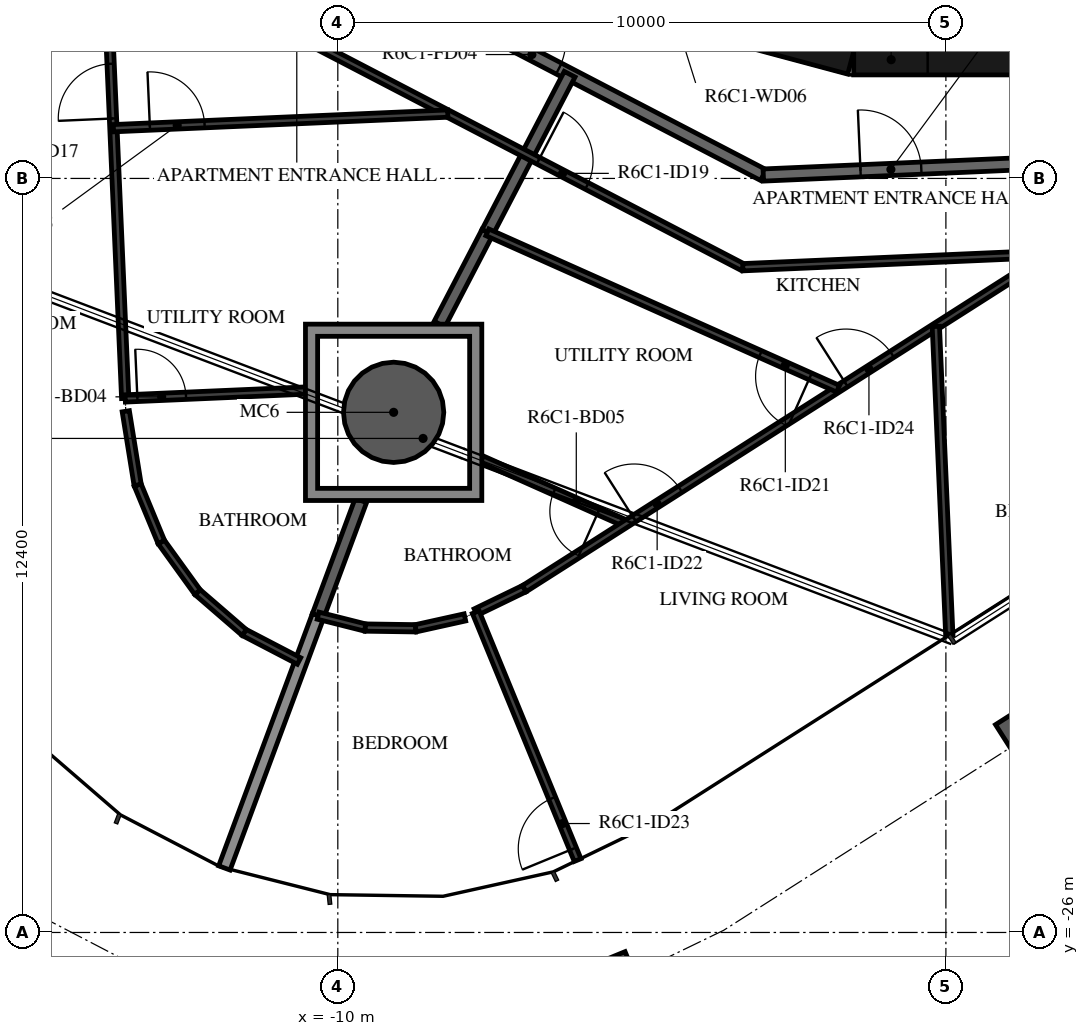
"""IFC4 building model, lengths in metres.
Left out: names, types, materials, properties, quantities, classifications, styles, units other than length and angle.
Written with IfcOpenShell. Run it as: python <this file> out.ifc"""

import sys

from ifc_helpers import new_model, si_unit, direction, frame, frame_2d, origin, origin_2d, place, context, subcontext, project, spatial, polyline, rectangle, hollow_circle, i_section, outline, extrude, element, fill, save


model = new_model("IFC4")
c1 = context("Model", 3, precision=1e-05, world=origin(), true_north=direction((0.0, 1.0)))
c2 = subcontext(c1, "Body", "Model", "MODEL_VIEW")
j1 = project(units=[si_unit("LENGTHUNIT", "METRE"), si_unit("PLANEANGLEUNIT", "RADIAN")], contexts=[c1])
p1 = place(None, origin())
s1 = spatial("IfcSite", under=j1, at=p1, CompositionType="ELEMENT")
p2 = place(p1, origin())
s2 = spatial("IfcBuilding", under=s1, at=p2, CompositionType="ELEMENT")
p3 = place(p2, frame((0.0, 0.0, 251.2)))
s3 = spatial("IfcBuildingStorey", under=s2, at=p3, CompositionType="ELEMENT", Elevation=251.2)
p4 = place(p3, frame((-9.082, -17.446, -0.38), z_axis=(0.0, 0.0, 1.0), x_axis=(1.0, 0.0, 0.0)))
e1 = element("IfcColumn", 1, at=p4, inside=s3, PredefinedType="COLUMN", context=c2, shape_type="SweptSolid", body=[
    extrude(hollow_circle(Radius=0.825, WallThickness=0.04, at=origin_2d()), origin(), (0.0, 0.0, 1.0), 3.5),
])
for number, where, z_axis, x_axis in (
    (2, (-5.243, -26.789, -0.38), (0.0, 0.0, 1.0), (-0.925, -0.38, 0.0)),
    (3, (1.185, -22.881, -0.38), (0.0, 0.0, 1.0), (-0.843, -0.537, 0.0)),
):
    element("IfcColumn", number, at=place(p3, frame(where, z_axis=z_axis, x_axis=x_axis)), inside=s3, PredefinedType="COLUMN", context=c2, shape_type="SweptSolid", body=[
        extrude(i_section(OverallWidth=0.3, OverallDepth=0.9, WebThickness=0.019, FlangeThickness=0.035, FilletRadius=0.03, at=origin_2d()), origin(), (0.0, 0.0, 1.0), 3.5),
    ])
p5 = place(p3, frame((-4.479, -10.858, 0.0), z_axis=(0.0, 0.0, 1.0), x_axis=(0.965948410781, -0.258734743916, 0.0)))
e4 = element("IfcWall", 4, at=p5, inside=s3, PredefinedType="SHEAR", context=c2, shape_type="SweptSolid", body=[
    extrude(rectangle(XDim=3.033, YDim=0.5, at=frame_2d((1.516, 0.0))), origin(), (0.0, 0.0, 1.0), 3.12),
])
p6 = place(p3, frame((-1.516, -11.647, 0.0), z_axis=(0.0, 0.0, 1.0), x_axis=(1.0, 0.0, 0.0)))
e5 = element("IfcWall", 5, at=p6, inside=s3, PredefinedType="SHEAR", context=c2, shape_type="SweptSolid", body=[
    extrude(rectangle(XDim=3.033, YDim=0.5, at=frame_2d((1.516, 0.0))), origin(), (0.0, 0.0, 1.0), 3.12),
])
p7 = place(p6, frame((0.016, 0.0, 0.0)))
e6 = element("IfcOpeningElement", 6, at=p7, cuts=e5, PredefinedType="OPENING", context=c2, shape_type="SweptSolid", body=[
    extrude(rectangle(XDim=1.2, YDim=2.1, at=frame_2d((0.6, 1.05))), frame((0.0, 0.26, 0.0), z_axis=(0.0, -1.0, 0.0), x_axis=(1.0, 0.0, 0.0)), (0.0, 0.0, 1.0), 0.52),
])
p8 = place(p3, frame((-9.372, -10.228, 0.0), z_axis=(0.0, 0.0, 1.0), x_axis=(0.887005184532, -0.461759464021, 0.0)))
e7 = element("IfcWall", 7, at=p8, inside=s3, PredefinedType="STANDARD", context=c2, shape_type="SweptSolid", body=[
    extrude(rectangle(XDim=7.181, YDim=0.2, at=frame_2d((3.591, 0.0))), origin(), (0.0, 0.0, 1.0), 3.12),
])
p9 = place(p8, frame((2.391, 0.0, 0.0)))
e8 = element("IfcOpeningElement", 8, at=p9, cuts=e7, PredefinedType="OPENING", context=c2, shape_type="SweptSolid", body=[
    extrude(rectangle(XDim=1.0, YDim=2.1, at=frame_2d((0.5, 1.05))), frame((0.0, 0.11, 0.0), z_axis=(0.0, -1.0, 0.0), x_axis=(1.0, 0.0, 0.0)), (0.0, 0.0, 1.0), 0.22),
])
p10 = place(p3, frame((-3.003, -13.544, 0.0), z_axis=(0.0, 0.0, 1.0), x_axis=(0.999048221872, 0.043619380718, 0.0)))
e9 = element("IfcWall", 9, at=p10, inside=s3, PredefinedType="STANDARD", context=c2, shape_type="SweptSolid", body=[
    extrude(rectangle(XDim=6.979, YDim=0.2, at=frame_2d((3.49, 0.0))), origin(), (0.0, 0.0, 1.0), 3.12),
])
p11 = place(p10, frame((1.6, 0.0, 0.0)))
e10 = element("IfcOpeningElement", 10, at=p11, cuts=e9, PredefinedType="OPENING", context=c2, shape_type="SweptSolid", body=[
    extrude(rectangle(XDim=1.0, YDim=2.1, at=frame_2d((0.5, 1.05))), frame((0.0, 0.11, 0.0), z_axis=(0.0, -1.0, 0.0), x_axis=(1.0, 0.0, 0.0)), (0.0, 0.0, 1.0), 0.22),
])
p12 = place(p3, frame((-7.541, -14.486, 0.0), z_axis=(0.0, 0.0, 1.0), x_axis=(0.461746051786, 0.88701216658, 0.0)))
e11 = element("IfcWall", 11, at=p12, inside=s3, PredefinedType="STANDARD", context=c2, shape_type="SweptSolid", body=[
    extrude(rectangle(XDim=2.931, YDim=0.2, at=frame_2d((1.466, 0.0))), origin(), (0.0, 0.0, 1.0), 3.12),
])
p13 = place(p3, frame((-11.865, -24.939, 0.0), z_axis=(0.0, 0.0, 1.0), x_axis=(0.348214227297, 0.937414983829, 0.0)))
e12 = element("IfcWall", 12, at=p13, inside=s3, PredefinedType="STANDARD", context=c2, shape_type="SweptSolid", body=[
    extrude(rectangle(XDim=4.426, YDim=0.2, at=frame_2d((2.213, 0.0))), origin(), (0.0, 0.0, 1.0), 2.73),
])
p14 = place(p3, frame((-8.327, -15.996, 0.0), z_axis=(0.0, 0.0, 1.0), x_axis=(0.461722915657, 0.887024210017, 0.0)))
e13 = element("IfcWall", 13, at=p14, inside=s3, PredefinedType="STANDARD", context=c2, shape_type="SweptSolid", body=[
    extrude(rectangle(XDim=1.703, YDim=0.2, at=frame_2d((0.851, 0.0))), origin(), (0.0, 0.0, 1.0), 3.12),
])
p15 = place(p3, frame((-10.324, -20.79, 0.0), z_axis=(0.0, 0.0, 1.0), x_axis=(0.348313973933, 0.937377925686, 0.0)))
e14 = element("IfcWall", 14, at=p15, inside=s3, PredefinedType="STANDARD", context=c2, shape_type="SweptSolid", body=[
    extrude(rectangle(XDim=2.02, YDim=0.2, at=frame_2d((1.01, 0.0))), origin(), (0.0, 0.0, 1.0), 3.12),
])
p16 = place(p3, frame((-10.421, -11.373, 0.0), z_axis=(0.0, 0.0, 1.0), x_axis=(0.887012970857, -0.461744506769, 0.0)))
e15 = element("IfcWall", 15, at=p16, inside=s3, PredefinedType="PARTITIONING", context=c2, shape_type="SweptSolid", body=[
    extrude(rectangle(XDim=7.985, YDim=0.12, at=frame_2d((3.992, 0.0))), origin(), (0.0, 0.0, 1.0), 3.12),
])
p17 = place(p16, frame((4.192, 0.0, 0.0)))
e16 = element("IfcOpeningElement", 16, at=p17, cuts=e15, PredefinedType="OPENING", context=c2, shape_type="SweptSolid", body=[
    extrude(rectangle(XDim=0.9, YDim=2.1, at=frame_2d((0.45, 1.05))), frame((0.0, 0.07, 0.0), z_axis=(0.0, -1.0, 0.0), x_axis=(1.0, 0.0, 0.0)), (0.0, 0.0, 1.0), 0.14),
])
p18 = place(p3, frame((-13.496, -17.218, 0.0), z_axis=(0.0, 0.0, 1.0), x_axis=(-0.043640714674, 0.999047290183, 0.0)))
e17 = element("IfcWall", 17, at=p18, inside=s3, PredefinedType="PARTITIONING", context=c2, shape_type="SweptSolid", body=[
    extrude(rectangle(XDim=8.487, YDim=0.12, at=frame_2d((4.243, 0.0))), origin(), (0.0, 0.0, 1.0), 3.12),
])
p19 = place(p18, frame((4.608, 0.0, 0.0)))
e18 = element("IfcOpeningElement", 18, at=p19, cuts=e17, PredefinedType="OPENING", context=c2, shape_type="SweptSolid", body=[
    extrude(rectangle(XDim=0.9, YDim=2.1, at=frame_2d((0.45, 1.05))), frame((0.0, 0.07, 0.0), z_axis=(0.0, -1.0, 0.0), x_axis=(1.0, 0.0, 0.0)), (0.0, 0.0, 1.0), 0.14),
])
p20 = place(p3, frame((-17.215, -14.57, 0.0), z_axis=(0.0, 0.0, 1.0), x_axis=(0.520949659667, 0.853587401555, 0.0)))
e19 = element("IfcWall", 19, at=p20, inside=s3, PredefinedType="PARTITIONING", context=c2, shape_type="SweptSolid", body=[
    extrude(rectangle(XDim=6.455, YDim=0.12, at=frame_2d((3.228, 0.0))), origin(), (0.0, 0.0, 1.0), 3.12),
])
p21 = place(p20, frame((1.2, 0.0, 0.0)))
e20 = element("IfcOpeningElement", 20, at=p21, cuts=e19, PredefinedType="OPENING", context=c2, shape_type="SweptSolid", body=[
    extrude(rectangle(XDim=0.9, YDim=2.1, at=frame_2d((0.45, 1.05))), frame((0.0, 0.07, 0.0), z_axis=(0.0, -1.0, 0.0), x_axis=(1.0, 0.0, 0.0)), (0.0, 0.0, 1.0), 0.14),
])
p22 = place(p3, frame((-13.69, -12.774, 0.0), z_axis=(0.0, 0.0, 1.0), x_axis=(0.999048778431, 0.043606631553, 0.0)))
e21 = element("IfcWall", 21, at=p22, inside=s3, PredefinedType="PARTITIONING", context=c2, shape_type="SweptSolid", body=[
    extrude(rectangle(XDim=5.503, YDim=0.12, at=frame_2d((2.752, 0.0))), origin(), (0.0, 0.0, 1.0), 3.12),
])
p23 = place(p22, frame((0.6, 0.0, 0.0)))
e22 = element("IfcOpeningElement", 22, at=p23, cuts=e21, PredefinedType="OPENING", context=c2, shape_type="SweptSolid", body=[
    extrude(rectangle(XDim=0.9, YDim=2.1, at=frame_2d((0.45, 1.05))), frame((0.0, 0.07, 0.0), z_axis=(0.0, -1.0, 0.0), x_axis=(1.0, 0.0, 0.0)), (0.0, 0.0, 1.0), 0.14),
])
for number, where, z_axis, x_axis in (
    (23, (-10.638, -21.536, 0.0), (0.0, 0.0, 1.0), (-0.887, 0.462, 0.0)),
    (24, (-11.539, -21.067, 0.0), (0.0, 0.0, 1.0), (-0.757, 0.654, 0.0)),
    (25, (-12.308, -20.402, 0.0), (0.0, 0.0, 1.0), (-0.585, 0.811, 0.0)),
):
    element("IfcWall", number, at=place(p3, frame(where, z_axis=z_axis, x_axis=x_axis)), inside=s3, PredefinedType="PARTITIONING", context=c2, shape_type="SweptSolid", body=[
        extrude(rectangle(XDim=1.016, YDim=0.12, at=frame_2d((0.508, 0.0))), origin(), (0.0, 0.0, 1.0), 3.12),
    ])
p24 = place(p3, frame((-12.903, -19.579, 0.0), z_axis=(0.0, 0.0, 1.0), x_axis=(-0.382754975976, 0.923849894932, 0.0)))
e26 = element("IfcWall", 26, at=p24, inside=s3, PredefinedType="PARTITIONING", context=c2, shape_type="SweptSolid", body=[
    extrude(rectangle(XDim=1.016, YDim=0.12, at=frame_2d((0.508, 0.0))), origin(), (0.0, 0.0, 1.0), 3.12),
])
p25 = place(p3, frame((-13.292, -18.64, 0.0), z_axis=(0.0, 0.0, 1.0), x_axis=(-0.159363796836, 0.98721992497, 0.0)))
e27 = element("IfcWall", 27, at=p25, inside=s3, PredefinedType="PARTITIONING", context=c2, shape_type="SweptSolid", body=[
    extrude(rectangle(XDim=1.227, YDim=0.12, at=frame_2d((0.614, 0.0))), origin(), (0.0, 0.0, 1.0), 3.12),
])
p26 = place(p3, frame((-13.496, -17.218, 0.0), z_axis=(0.0, 0.0, 1.0), x_axis=(0.999044946677, 0.043694330507, 0.0)))
e28 = element("IfcWall", 28, at=p26, inside=s3, PredefinedType="PARTITIONING", context=c2, shape_type="SweptSolid", body=[
    extrude(rectangle(XDim=2.967, YDim=0.12, at=frame_2d((1.483, 0.0))), origin(), (0.0, 0.0, 1.0), 3.12),
])
p27 = place(p26, frame((0.2, 0.0, 0.0)))
e29 = element("IfcOpeningElement", 29, at=p27, cuts=e28, PredefinedType="OPENING", context=c2, shape_type="SweptSolid", body=[
    extrude(rectangle(XDim=0.8, YDim=2.1, at=frame_2d((0.4, 1.05))), frame((0.0, 0.07, 0.0), z_axis=(0.0, -1.0, 0.0), x_axis=(1.0, 0.0, 0.0)), (0.0, 0.0, 1.0), 0.14),
])
p28 = place(p3, frame((-3.339, -15.06, 0.0), z_axis=(0.0, 0.0, 1.0), x_axis=(0.999047716945, 0.043630943905, 0.0)))
e30 = element("IfcWall", 30, at=p28, inside=s3, PredefinedType="PARTITIONING", context=c2, shape_type="SweptSolid", body=[
    extrude(rectangle(XDim=7.985, YDim=0.12, at=frame_2d((3.992, 0.0))), origin(), (0.0, 0.0, 1.0), 3.12),
])
p29 = place(p28, frame((5.253, 0.0, 0.0)))
e31 = element("IfcOpeningElement", 31, at=p29, cuts=e30, PredefinedType="OPENING", context=c2, shape_type="SweptSolid", body=[
    extrude(rectangle(XDim=0.9, YDim=2.1, at=frame_2d((0.45, 1.05))), frame((0.0, 0.07, 0.0), z_axis=(0.0, -1.0, 0.0), x_axis=(1.0, 0.0, 0.0)), (0.0, 0.0, 1.0), 0.14),
])
p30 = place(p3, frame((-10.324, -20.79, 0.0), z_axis=(0.0, 0.0, 1.0), x_axis=(0.969547579982, -0.244903021933, 0.0)))
e32 = element("IfcWall", 32, at=p30, inside=s3, PredefinedType="PARTITIONING", context=c2, shape_type="SweptSolid", body=[
    extrude(rectangle(XDim=0.801, YDim=0.12, at=frame_2d((0.4, 0.0))), origin(), (0.0, 0.0, 1.0), 3.12),
])
p31 = place(p3, frame((-9.548, -20.986, 0.0), z_axis=(0.0, 0.0, 1.0), x_axis=(0.999895921986, -0.014427237979, 0.0)))
e33 = element("IfcWall", 33, at=p31, inside=s3, PredefinedType="PARTITIONING", context=c2, shape_type="SweptSolid", body=[
    extrude(rectangle(XDim=0.829, YDim=0.12, at=frame_2d((0.415, 0.0))), origin(), (0.0, 0.0, 1.0), 3.12),
])
p32 = place(p3, frame((-8.719, -20.998, 0.0), z_axis=(0.0, 0.0, 1.0), x_axis=(0.976339323235, 0.216244134959, 0.0)))
e34 = element("IfcWall", 34, at=p32, inside=s3, PredefinedType="PARTITIONING", context=c2, shape_type="SweptSolid", body=[
    extrude(rectangle(XDim=0.829, YDim=0.12, at=frame_2d((0.414, 0.0))), origin(), (0.0, 0.0, 1.0), 3.12),
])
p33 = place(p3, frame((-5.256, -19.278, 0.0), z_axis=(0.0, 0.0, 1.0), x_axis=(-0.913284429849, 0.407322415532, 0.0)))
e35 = element("IfcWall", 35, at=p33, inside=s3, PredefinedType="PARTITIONING", context=c2, shape_type="SweptSolid", body=[
    extrude(rectangle(XDim=2.601, YDim=0.12, at=frame_2d((1.301, 0.0))), origin(), (0.0, 0.0, 1.0), 3.12),
])
p34 = place(p33, frame((0.5, 0.0, 0.0)))
e36 = element("IfcOpeningElement", 36, at=p34, cuts=e35, PredefinedType="OPENING", context=c2, shape_type="SweptSolid", body=[
    extrude(rectangle(XDim=0.8, YDim=2.1, at=frame_2d((0.4, 1.05))), frame((0.0, 0.07, 0.0), z_axis=(0.0, -1.0, 0.0), x_axis=(1.0, 0.0, 0.0)), (0.0, 0.0, 1.0), 0.14),
])
p35 = place(p3, frame((-7.732, -20.732, 0.0), z_axis=(0.0, 0.0, 1.0), x_axis=(0.900065466697, 0.435754696659, 0.0)))
e37 = element("IfcWall", 37, at=p35, inside=s3, PredefinedType="PARTITIONING", context=c2, shape_type="SweptSolid", body=[
    extrude(rectangle(XDim=0.889, YDim=0.12, at=frame_2d((0.445, 0.0))), origin(), (0.0, 0.0, 1.0), 3.12),
])
p36 = place(p3, frame((-6.932, -20.345, 0.0), z_axis=(0.0, 0.0, 1.0), x_axis=(0.843388627156, 0.537304032726, 0.0)))
e38 = element("IfcWall", 38, at=p36, inside=s3, PredefinedType="PARTITIONING", context=c2, shape_type="SweptSolid", body=[
    extrude(rectangle(XDim=10.246, YDim=0.12, at=frame_2d((5.123, 0.0))), origin(), (0.0, 0.0, 1.0), 3.12),
])
p37 = place(p36, frame((2.138, 0.0, 0.0)))
e39 = element("IfcOpeningElement", 39, at=p37, cuts=e38, PredefinedType="OPENING", context=c2, shape_type="SweptSolid", body=[
    extrude(rectangle(XDim=0.9, YDim=2.1, at=frame_2d((0.45, 1.05))), frame((0.0, 0.07, 0.0), z_axis=(0.0, -1.0, 0.0), x_axis=(1.0, 0.0, 0.0)), (0.0, 0.0, 1.0), 0.14),
])
p38 = place(p36, frame((6.268, 0.0, 0.0)))
e40 = element("IfcOpeningElement", 40, at=p38, cuts=e38, PredefinedType="OPENING", context=c2, shape_type="SweptSolid", body=[
    extrude(rectangle(XDim=0.9, YDim=2.1, at=frame_2d((0.45, 1.05))), frame((0.0, 0.07, 0.0), z_axis=(0.0, -1.0, 0.0), x_axis=(1.0, 0.0, 0.0)), (0.0, 0.0, 1.0), 0.14),
])
p39 = place(p3, frame((-6.057, -24.81, 0.0), z_axis=(0.0, 0.0, 1.0), x_axis=(-0.380044941584, 0.924968022354, 0.0)))
e41 = element("IfcWall", 41, at=p39, inside=s3, PredefinedType="PARTITIONING", context=c2, shape_type="SweptSolid", body=[
    extrude(rectangle(XDim=4.408, YDim=0.12, at=frame_2d((2.204, 0.0))), origin(), (0.0, 0.0, 1.0), 3.12),
])
p40 = place(p39, frame((0.2, 0.0, 0.0)))
e42 = element("IfcOpeningElement", 42, at=p40, cuts=e41, PredefinedType="OPENING", context=c2, shape_type="SweptSolid", body=[
    extrude(rectangle(XDim=0.9, YDim=2.1, at=frame_2d((0.45, 1.05))), frame((0.0, 0.07, 0.0), z_axis=(0.0, -1.0, 0.0), x_axis=(1.0, 0.0, 0.0)), (0.0, 0.0, 1.0), 0.14),
])
p41 = place(p3, frame((-1.773, -17.059, 0.0), z_axis=(0.0, 0.0, 1.0), x_axis=(-0.913279926902, 0.407332511736, 0.0)))
e43 = element("IfcWall", 43, at=p41, inside=s3, PredefinedType="PARTITIONING", context=c2, shape_type="SweptSolid", body=[
    extrude(rectangle(XDim=6.315, YDim=0.12, at=frame_2d((3.158, 0.0))), origin(), (0.0, 0.0, 1.0), 3.12),
])
p42 = place(p41, frame((0.5, 0.0, 0.0)))
e44 = element("IfcOpeningElement", 44, at=p42, cuts=e43, PredefinedType="OPENING", context=c2, shape_type="SweptSolid", body=[
    extrude(rectangle(XDim=0.9, YDim=2.1, at=frame_2d((0.45, 1.05))), frame((0.0, 0.07, 0.0), z_axis=(0.0, -1.0, 0.0), x_axis=(1.0, 0.0, 0.0)), (0.0, 0.0, 1.0), 0.14),
])
p43 = place(p3, frame((0.056, -21.11, 0.0), z_axis=(0.0, 0.0, 1.0), x_axis=(-0.043583193193, 0.999049801197, 0.0)))
e45 = element("IfcWall", 45, at=p43, inside=s3, PredefinedType="PARTITIONING", context=c2, shape_type="SweptSolid", body=[
    extrude(rectangle(XDim=5.081, YDim=0.12, at=frame_2d((2.541, 0.0))), origin(), (0.0, 0.0, 1.0), 3.12),
])
p44 = place(p3, origin())
e46 = element("IfcWall", 46, at=p44, inside=s3, PredefinedType="STANDARD", context=c2, shape_type="SweptSolid", body=[
    extrude(outline(polyline([(-7.632, -15.996), (-7.632, -18.896), (-10.532, -18.896), (-10.532, -15.996), (-7.632, -15.996)]), holes=[polyline([(-10.332, -18.696), (-7.832, -18.696), (-7.832, -16.196), (-10.332, -16.196), (-10.332, -18.696)])]), origin(), (0.0, 0.0, 1.0), 3.12),
])
p45 = place(p7, origin())
e47 = element("IfcDoor", 47, at=p45, inside=s3, OperationType="SINGLE_SWING_RIGHT", PredefinedType="DOOR", context=c2, shape_type="SweptSolid", body=[
    extrude(rectangle(XDim=1.2, YDim=2.1, at=frame_2d((0.6, 1.05))), frame((0.0, 0.025, 0.0), z_axis=(0.0, -1.0, 0.0), x_axis=(1.0, 0.0, 0.0)), (0.0, 0.0, 1.0), 0.05),
])
fill(e6, e47)
p46 = place(p9, origin())
e48 = element("IfcDoor", 48, at=p46, inside=s3, OperationType="SINGLE_SWING_RIGHT", PredefinedType="DOOR", context=c2, shape_type="SweptSolid", body=[
    extrude(rectangle(XDim=1.0, YDim=2.1, at=frame_2d((0.5, 1.05))), frame((0.0, 0.025, 0.0), z_axis=(0.0, -1.0, 0.0), x_axis=(1.0, 0.0, 0.0)), (0.0, 0.0, 1.0), 0.05),
])
fill(e8, e48)
p47 = place(p19, origin())
e49 = element("IfcDoor", 49, at=p47, inside=s3, OperationType="SINGLE_SWING_RIGHT", PredefinedType="DOOR", context=c2, shape_type="SweptSolid", body=[
    extrude(rectangle(XDim=0.9, YDim=2.1, at=frame_2d((0.45, 1.05))), frame((0.0, 0.025, 0.0), z_axis=(0.0, -1.0, 0.0), x_axis=(1.0, 0.0, 0.0)), (0.0, 0.0, 1.0), 0.05),
])
fill(e18, e49)
p48 = place(p23, origin())
e50 = element("IfcDoor", 50, at=p48, inside=s3, OperationType="SINGLE_SWING_RIGHT", PredefinedType="DOOR", context=c2, shape_type="SweptSolid", body=[
    extrude(rectangle(XDim=0.9, YDim=2.1, at=frame_2d((0.45, 1.05))), frame((0.0, 0.025, 0.0), z_axis=(0.0, -1.0, 0.0), x_axis=(1.0, 0.0, 0.0)), (0.0, 0.0, 1.0), 0.05),
])
fill(e22, e50)
p49 = place(p27, origin())
e51 = element("IfcDoor", 51, at=p49, inside=s3, OperationType="SINGLE_SWING_RIGHT", PredefinedType="DOOR", context=c2, shape_type="SweptSolid", body=[
    extrude(rectangle(XDim=0.8, YDim=2.1, at=frame_2d((0.4, 1.05))), frame((0.0, 0.025, 0.0), z_axis=(0.0, -1.0, 0.0), x_axis=(1.0, 0.0, 0.0)), (0.0, 0.0, 1.0), 0.05),
])
fill(e29, e51)
p50 = place(p11, origin())
e52 = element("IfcDoor", 52, at=p50, inside=s3, OperationType="SINGLE_SWING_LEFT", PredefinedType="DOOR", context=c2, shape_type="SweptSolid", body=[
    extrude(rectangle(XDim=1.0, YDim=2.1, at=frame_2d((0.5, 1.05))), frame((0.0, 0.025, 0.0), z_axis=(0.0, -1.0, 0.0), x_axis=(1.0, 0.0, 0.0)), (0.0, 0.0, 1.0), 0.05),
])
fill(e10, e52)
p51 = place(p17, origin())
e53 = element("IfcDoor", 53, at=p51, inside=s3, OperationType="SINGLE_SWING_LEFT", PredefinedType="DOOR", context=c2, shape_type="SweptSolid", body=[
    extrude(rectangle(XDim=0.9, YDim=2.1, at=frame_2d((0.45, 1.05))), frame((0.0, 0.025, 0.0), z_axis=(0.0, -1.0, 0.0), x_axis=(1.0, 0.0, 0.0)), (0.0, 0.0, 1.0), 0.05),
])
fill(e16, e53)
p52 = place(p42, origin())
e54 = element("IfcDoor", 54, at=p52, inside=s3, OperationType="SINGLE_SWING_LEFT", PredefinedType="DOOR", context=c2, shape_type="SweptSolid", body=[
    extrude(rectangle(XDim=0.9, YDim=2.1, at=frame_2d((0.45, 1.05))), frame((0.0, 0.025, 0.0), z_axis=(0.0, -1.0, 0.0), x_axis=(1.0, 0.0, 0.0)), (0.0, 0.0, 1.0), 0.05),
])
fill(e44, e54)
p53 = place(p34, origin())
e55 = element("IfcDoor", 55, at=p53, inside=s3, OperationType="SINGLE_SWING_LEFT", PredefinedType="DOOR", context=c2, shape_type="SweptSolid", body=[
    extrude(rectangle(XDim=0.8, YDim=2.1, at=frame_2d((0.4, 1.05))), frame((0.0, 0.025, 0.0), z_axis=(0.0, -1.0, 0.0), x_axis=(1.0, 0.0, 0.0)), (0.0, 0.0, 1.0), 0.05),
])
fill(e36, e55)
p54 = place(p37, origin())
e56 = element("IfcDoor", 56, at=p54, inside=s3, OperationType="SINGLE_SWING_LEFT", PredefinedType="DOOR", context=c2, shape_type="SweptSolid", body=[
    extrude(rectangle(XDim=0.9, YDim=2.1, at=frame_2d((0.45, 1.05))), frame((0.0, 0.025, 0.0), z_axis=(0.0, -1.0, 0.0), x_axis=(1.0, 0.0, 0.0)), (0.0, 0.0, 1.0), 0.05),
])
fill(e39, e56)
p55 = place(p40, origin())
e57 = element("IfcDoor", 57, at=p55, inside=s3, OperationType="SINGLE_SWING_LEFT", PredefinedType="DOOR", context=c2, shape_type="SweptSolid", body=[
    extrude(rectangle(XDim=0.9, YDim=2.1, at=frame_2d((0.45, 1.05))), frame((0.0, 0.025, 0.0), z_axis=(0.0, -1.0, 0.0), x_axis=(1.0, 0.0, 0.0)), (0.0, 0.0, 1.0), 0.05),
])
fill(e42, e57)
p56 = place(p38, origin())
e58 = element("IfcDoor", 58, at=p56, inside=s3, OperationType="SINGLE_SWING_RIGHT", PredefinedType="DOOR", context=c2, shape_type="SweptSolid", body=[
    extrude(rectangle(XDim=0.9, YDim=2.1, at=frame_2d((0.45, 1.05))), frame((0.0, 0.025, 0.0), z_axis=(0.0, -1.0, 0.0), x_axis=(1.0, 0.0, 0.0)), (0.0, 0.0, 1.0), 0.05),
])
fill(e40, e58)
save(model, sys.argv[1])
